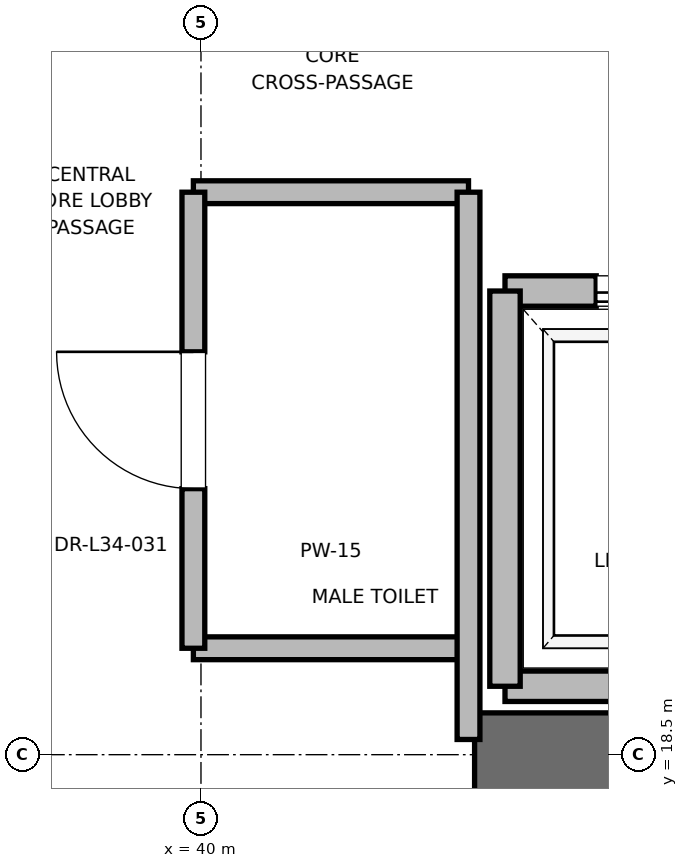
"""IFC4 building model, lengths in metres.
Left out: names, types, materials, properties, quantities, classifications, styles, units other than length and angle.
Written with IfcOpenShell. Run it as: python <this file> out.ifc"""

import sys

from ifc_helpers import new_model, si_unit, direction, frame, frame_2d, origin, place, context, subcontext, project, spatial, rectangle, extrude, element, fill, save


model = new_model("IFC4")
c1 = context("Model", 3, precision=1e-05, world=origin(), true_north=direction((0.0, 1.0)))
c2 = subcontext(c1, "Body", "Model", "MODEL_VIEW")
j1 = project(units=[si_unit("LENGTHUNIT", "METRE"), si_unit("PLANEANGLEUNIT", "RADIAN")], contexts=[c1])
p1 = place(None, origin())
s1 = spatial("IfcSite", under=j1, at=p1, CompositionType="ELEMENT")
p2 = place(p1, origin())
s2 = spatial("IfcBuilding", under=s1, at=p2, CompositionType="ELEMENT")
p3 = place(p2, frame((0.0, 0.0, 148.4)))
s3 = spatial("IfcBuildingStorey", under=s2, at=p3, CompositionType="ELEMENT", Elevation=148.4)
p4 = place(p3, frame((41.8, 18.5, 0.0), z_axis=(0.0, 0.0, 1.0), x_axis=(1.0, 0.0, 0.0)))
e1 = element("IfcWall", 1, at=p4, inside=s3, PredefinedType="SHEAR", context=c2, shape_type="SweptSolid", body=[
    extrude(rectangle(XDim=9.2, YDim=0.55, at=frame_2d((4.6, 0.0))), origin(), (0.0, 0.0, 1.0), 3.775),
])
p5 = place(p3, frame((42.0, 18.95, 0.0), z_axis=(0.0, 0.0, 1.0), x_axis=(1.0, 0.0, 0.0)))
e2 = element("IfcWall", 2, at=p5, inside=s3, PredefinedType="SOLIDWALL", context=c2, shape_type="SweptSolid", body=[
    extrude(rectangle(XDim=2.3, YDim=0.2, at=frame_2d((1.15, 0.0))), origin(), (0.0, 0.0, 1.0), 2.755),
])
p6 = place(p3, frame((44.3, 21.55, 0.0), z_axis=(0.0, 0.0, 1.0), x_axis=(-1.0, 0.0, 0.0)))
e3 = element("IfcWall", 3, at=p6, inside=s3, PredefinedType="SOLIDWALL", context=c2, shape_type="SweptSolid", body=[
    extrude(rectangle(XDim=2.3, YDim=0.2, at=frame_2d((1.15, 0.0))), origin(), (0.0, 0.0, 1.0), 3.775),
])
p7 = place(p6, frame((0.6, 0.0, 0.0)))
e4 = element("IfcOpeningElement", 4, at=p7, cuts=e3, PredefinedType="OPENING", context=c2, shape_type="SweptSolid", body=[
    extrude(rectangle(XDim=1.1, YDim=2.2, at=frame_2d((0.55, 1.1))), frame((0.0, 0.1, 0.0), z_axis=(0.0, -1.0, 0.0), x_axis=(1.0, 0.0, 0.0)), (0.0, 0.0, 1.0), 0.2),
])
p8 = place(p3, frame((42.0, 21.55, 0.0), z_axis=(0.0, 0.0, 1.0), x_axis=(0.0, -1.0, 0.0)))
e5 = element("IfcWall", 5, at=p8, inside=s3, PredefinedType="SOLIDWALL", context=c2, shape_type="SweptSolid", body=[
    extrude(rectangle(XDim=2.6, YDim=0.2, at=frame_2d((1.3, 0.0))), origin(), (0.0, 0.0, 1.0), 2.755),
])
for number, where, z_axis, x_axis in (
    (6, (39.95, 19.2, 0.0), (0.0, 0.0, 1.0), (1.0, 0.0, 0.0)),
    (7, (39.95, 22.2, 0.0), (0.0, 0.0, 1.0), (1.0, 0.0, 0.0)),
):
    element("IfcWall", number, at=place(p3, frame(where, z_axis=z_axis, x_axis=x_axis)), inside=s3, PredefinedType="PARTITIONING", context=c2, shape_type="SweptSolid", body=[
        extrude(rectangle(XDim=1.81, YDim=0.15, at=frame_2d((0.905, 0.0))), origin(), (0.0, 0.0, 1.0), 2.85),
    ])
p9 = place(p3, frame((41.76, 18.6, 0.0), z_axis=(0.0, 0.0, 1.0), x_axis=(0.0, 1.0, 0.0)))
e8 = element("IfcWall", 8, at=p9, inside=s3, PredefinedType="PARTITIONING", context=c2, shape_type="SweptSolid", body=[
    extrude(rectangle(XDim=3.6, YDim=0.15, at=frame_2d((1.8, 0.0))), origin(), (0.0, 0.0, 1.0), 2.755),
])
p10 = place(p3, frame((39.95, 19.2, 0.0), z_axis=(0.0, 0.0, 1.0), x_axis=(0.0, 1.0, 0.0)))
e9 = element("IfcWall", 9, at=p10, inside=s3, PredefinedType="PARTITIONING", context=c2, shape_type="SweptSolid", body=[
    extrude(rectangle(XDim=3.0, YDim=0.15, at=frame_2d((1.5, 0.0))), origin(), (0.0, 0.0, 1.0), 2.85),
])
p11 = place(p10, frame((1.05, 0.0, 0.0)))
e10 = element("IfcOpeningElement", 10, at=p11, cuts=e9, PredefinedType="OPENING", context=c2, shape_type="SweptSolid", body=[
    extrude(rectangle(XDim=0.9, YDim=2.1, at=frame_2d((0.45, 1.05))), frame((0.0, 0.075, 0.0), z_axis=(0.0, -1.0, 0.0), x_axis=(1.0, 0.0, 0.0)), (0.0, 0.0, 1.0), 0.15),
])
p12 = place(p7, origin())
e11 = element("IfcDoor", 11, at=p12, inside=s3, OperationType="SLIDING_TO_RIGHT", PredefinedType="DOOR", context=c2, shape_type="SweptSolid", body=[
    extrude(rectangle(XDim=1.1, YDim=2.2, at=frame_2d((0.55, 1.1))), frame((0.0, 0.025, 0.0), z_axis=(0.0, -1.0, 0.0), x_axis=(1.0, 0.0, 0.0)), (0.0, 0.0, 1.0), 0.05),
])
fill(e4, e11)
p13 = place(p11, origin())
e12 = element("IfcDoor", 12, at=p13, inside=s3, OperationType="SINGLE_SWING_RIGHT", PredefinedType="DOOR", context=c2, shape_type="SweptSolid", body=[
    extrude(rectangle(XDim=0.9, YDim=2.1, at=frame_2d((0.45, 1.05))), frame((0.0, 0.025, 0.0), z_axis=(0.0, -1.0, 0.0), x_axis=(1.0, 0.0, 0.0)), (0.0, 0.0, 1.0), 0.05),
])
fill(e10, e12)
save(model, sys.argv[1])
